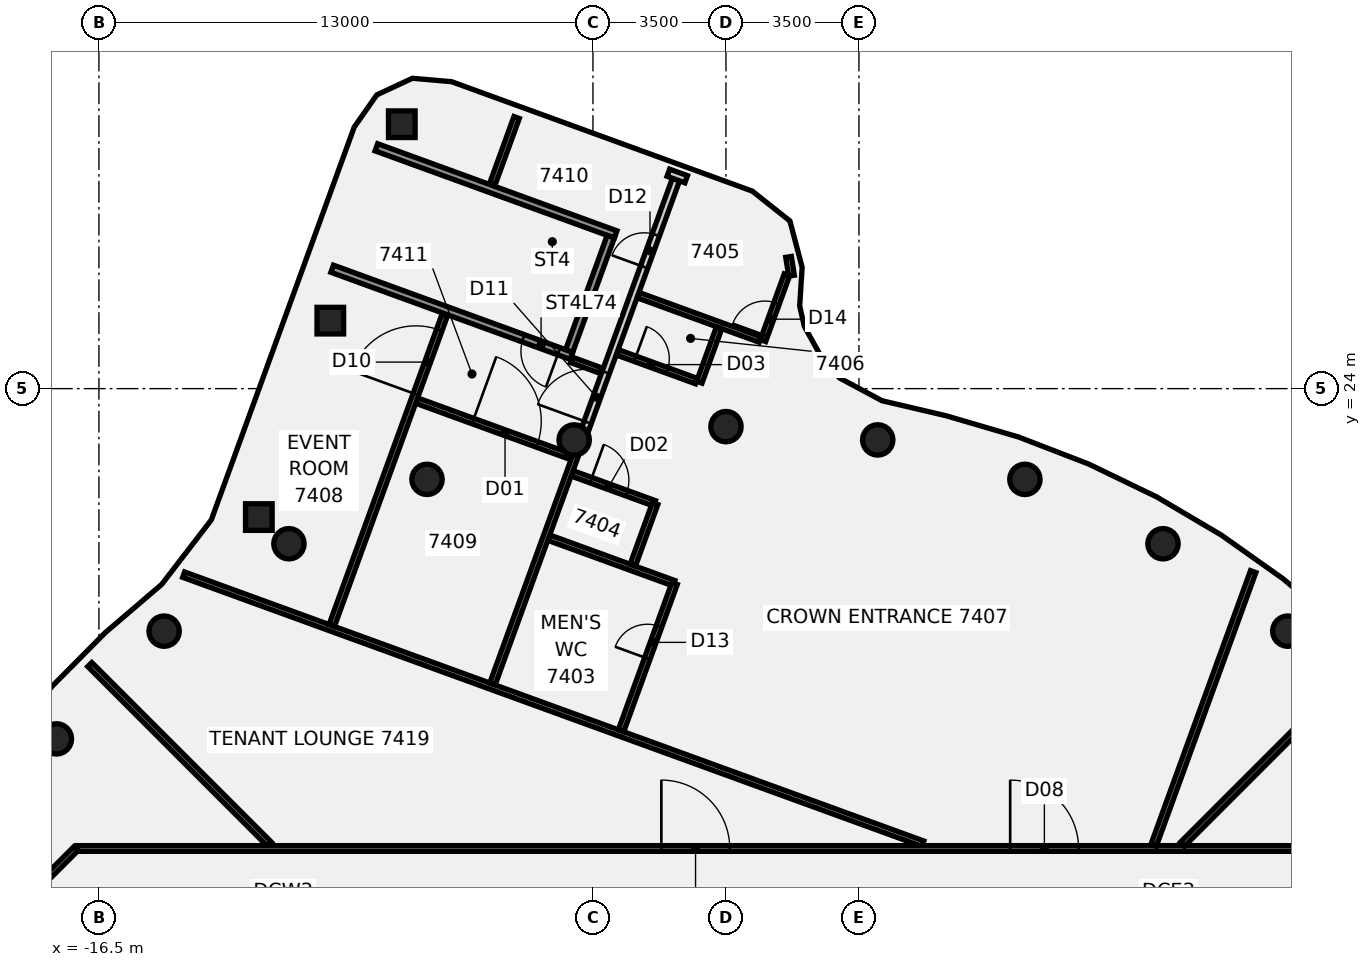
"""IFC4 building model, lengths in metres.
Left out: names, types, materials, properties, quantities, classifications, styles, units other than length and angle.
Written with IfcOpenShell. Run it as: python <this file> out.ifc"""

import sys

from ifc_helpers import new_model, si_unit, direction, frame, frame_2d, origin, origin_2d, place, context, subcontext, project, spatial, polyline, rectangle, circle, outline, extrude, element, fill, save


model = new_model("IFC4")
c1 = context("Model", 3, precision=1e-05, world=origin(), true_north=direction((0.0, 1.0)))
c2 = subcontext(c1, "Body", "Model", "MODEL_VIEW")
j1 = project(units=[si_unit("LENGTHUNIT", "METRE"), si_unit("PLANEANGLEUNIT", "RADIAN")], contexts=[c1])
p1 = place(None, origin())
s1 = spatial("IfcSite", under=j1, at=p1, CompositionType="ELEMENT")
p2 = place(p1, origin())
s2 = spatial("IfcBuilding", under=s1, at=p2, CompositionType="ELEMENT")
p3 = place(p2, frame((0.0, 0.0, 299.4)))
s3 = spatial("IfcBuildingStorey", under=s2, at=p3, CompositionType="ELEMENT", Elevation=299.4)
for number, where, z_axis, x_axis in (
    (1, (14.784, 17.619, -0.25), (0.0, 0.0, 1.0), (1.0, 0.0, 0.0)),
    (2, (11.5, 19.919, -0.25), (0.0, 0.0, 1.0), (1.0, 0.0, 0.0)),
    (3, (7.866, 21.613, -0.25), (0.0, 0.0, 1.0), (1.0, 0.0, 0.0)),
    (4, (3.994, 22.651, -0.25), (0.0, 0.0, 1.0), (1.0, 0.0, 0.0)),
    (5, (0.0, 23.0, -0.25), (0.0, 0.0, 1.0), (1.0, 0.0, 0.0)),
    (6, (-3.994, 22.651, -0.25), (0.0, 0.0, 1.0), (1.0, 0.0, 0.0)),
    (7, (-7.866, 21.613, -0.25), (0.0, 0.0, 1.0), (1.0, 0.0, 0.0)),
    (8, (-11.5, 19.919, -0.25), (0.0, 0.0, 1.0), (1.0, 0.0, 0.0)),
    (9, (-14.784, 17.619, -0.25), (0.0, 0.0, 1.0), (1.0, 0.0, 0.0)),
    (10, (-17.619, 14.784, -0.25), (0.0, 0.0, 1.0), (1.0, 0.0, 0.0)),
):
    element("IfcColumn", number, at=place(p3, frame(where, z_axis=z_axis, x_axis=x_axis)), inside=s3, PredefinedType="COLUMN", context=c2, shape_type="SweptSolid", body=[
        extrude(circle(Radius=0.4, at=origin_2d()), origin(), (0.0, 0.0, 1.0), 6.07),
    ])
for number, where, z_axis, x_axis in (
    (11, (-8.53, 30.957, -0.228), (0.0, 0.0, 1.0), (0.342, 0.94, 0.0)),
    (12, (-10.411, 25.789, -0.228), (0.0, 0.0, 1.0), (0.342, 0.94, 0.0)),
    (13, (-12.292, 20.621, -0.228), (0.0, 0.0, 1.0), (0.342, 0.94, 0.0)),
):
    element("IfcColumn", number, at=place(p3, frame(where, z_axis=z_axis, x_axis=x_axis)), inside=s3, PredefinedType="COLUMN", context=c2, shape_type="SweptSolid", body=[
        extrude(rectangle(XDim=0.7, YDim=0.7, at=origin_2d()), origin(), (0.0, 0.0, 1.0), 6.048),
    ])
p4 = place(p3, frame((-16.74, 16.74, 0.0), z_axis=(0.0, 0.0, 1.0), x_axis=(0.707106781187, -0.707106781187, 0.0)))
e14 = element("IfcWall", 14, at=p4, inside=s3, PredefinedType="PARTITIONING", context=c2, shape_type="SweptSolid", body=[
    extrude(rectangle(XDim=6.691, YDim=0.15, at=frame_2d((3.345, 0.0))), origin(), (0.0, 0.0, 1.0), 5.02),
])
p5 = place(p3, frame((-14.271, 19.106, 0.0), z_axis=(0.0, 0.0, 1.0), x_axis=(0.939707995486, -0.34197789873, 0.0)))
e15 = element("IfcWall", 15, at=p5, inside=s3, PredefinedType="PARTITIONING", context=c2, shape_type="SweptSolid", body=[
    extrude(rectangle(XDim=20.7, YDim=0.15, at=frame_2d((10.35, 0.0))), origin(), (0.0, 0.0, 1.0), 5.02),
])
p6 = place(p3, frame((-8.139, 23.685, 0.0), z_axis=(0.0, 0.0, 1.0), x_axis=(0.939717938518, -0.341950575415, 0.0)))
e16 = element("IfcWall", 16, at=p6, inside=s3, PredefinedType="PARTITIONING", context=c2, shape_type="SweptSolid", body=[
    extrude(rectangle(XDim=4.345, YDim=0.15, at=frame_2d((2.173, 0.0))), origin(), (0.0, 0.0, 1.0), 5.02),
])
p7 = place(p6, frame((1.575, 0.0, 0.0)))
e17 = element("IfcOpeningElement", 17, at=p7, cuts=e16, PredefinedType="OPENING", context=c2, shape_type="SweptSolid", body=[
    extrude(rectangle(XDim=1.8, YDim=2.1, at=frame_2d((0.9, 1.05))), frame((0.0, 0.085, 0.0), z_axis=(0.0, -1.0, 0.0), x_axis=(1.0, 0.0, 0.0)), (0.0, 0.0, 1.0), 0.17),
])
p8 = place(p3, frame((-4.664, 20.079, 0.0), z_axis=(0.0, 0.0, 1.0), x_axis=(0.939632669741, -0.342184812574, 0.0)))
e18 = element("IfcWall", 18, at=p8, inside=s3, PredefinedType="PARTITIONING", context=c2, shape_type="SweptSolid", body=[
    extrude(rectangle(XDim=3.505, YDim=0.15, at=frame_2d((1.753, 0.0))), origin(), (0.0, 0.0, 1.0), 5.02),
])
p9 = place(p3, frame((-4.048, 21.77, 0.0), z_axis=(0.0, 0.0, 1.0), x_axis=(0.939651079277, -0.342134256123, 0.0)))
e19 = element("IfcWall", 19, at=p9, inside=s3, PredefinedType="PARTITIONING", context=c2, shape_type="SweptSolid", body=[
    extrude(rectangle(XDim=2.305, YDim=0.15, at=frame_2d((1.152, 0.0))), origin(), (0.0, 0.0, 1.0), 5.02),
])
p10 = place(p9, frame((0.525, 0.0, 0.0)))
e20 = element("IfcOpeningElement", 20, at=p10, cuts=e19, PredefinedType="OPENING", context=c2, shape_type="SweptSolid", body=[
    extrude(rectangle(XDim=1.0, YDim=2.1, at=frame_2d((0.5, 1.05))), frame((0.0, 0.085, 0.0), z_axis=(0.0, -1.0, 0.0), x_axis=(1.0, 0.0, 0.0)), (0.0, 0.0, 1.0), 0.17),
])
p11 = place(p3, frame((-4.063, 24.756, 0.0), z_axis=(0.0, 0.0, 1.0), x_axis=(0.939710329429, -0.341971485308, 0.0)))
e21 = element("IfcWall", 21, at=p11, inside=s3, PredefinedType="PARTITIONING", context=c2, shape_type="SweptSolid", body=[
    extrude(rectangle(XDim=0.858, YDim=0.15, at=frame_2d((0.429, 0.0))), origin(), (0.0, 0.0, 1.0), 5.02),
])
p12 = place(p3, frame((-2.861, 24.957, 0.0), z_axis=(0.0, 0.0, 1.0), x_axis=(0.93968419655, -0.342043287836, 0.0)))
e22 = element("IfcWall", 22, at=p12, inside=s3, PredefinedType="PARTITIONING", context=c2, shape_type="SweptSolid", body=[
    extrude(rectangle(XDim=2.22, YDim=0.15, at=frame_2d((1.11, 0.0))), origin(), (0.0, 0.0, 1.0), 5.02),
])
p13 = place(p12, frame((0.5, 0.0, 0.0)))
e23 = element("IfcOpeningElement", 23, at=p13, cuts=e22, PredefinedType="OPENING", context=c2, shape_type="SweptSolid", body=[
    extrude(rectangle(XDim=0.9, YDim=2.1, at=frame_2d((0.45, 1.05))), frame((0.0, 0.085, 0.0), z_axis=(0.0, -1.0, 0.0), x_axis=(1.0, 0.0, 0.0)), (0.0, 0.0, 1.0), 0.17),
])
p14 = place(p3, frame((-2.314, 26.461, 0.0), z_axis=(0.0, 0.0, 1.0), x_axis=(0.939653710072, -0.342127030718, 0.0)))
e24 = element("IfcWall", 24, at=p14, inside=s3, PredefinedType="PARTITIONING", context=c2, shape_type="SweptSolid", body=[
    extrude(rectangle(XDim=3.42, YDim=0.15, at=frame_2d((1.71, 0.0))), origin(), (0.0, 0.0, 1.0), 5.02),
])
p15 = place(p3, frame((-17.065, 11.9, 0.0), z_axis=(0.0, 0.0, 1.0), x_axis=(1.0, 0.0, 0.0)))
e25 = element("IfcWall", 25, at=p15, inside=s3, PredefinedType="PARTITIONING", context=c2, shape_type="SweptSolid", body=[
    extrude(rectangle(XDim=34.165, YDim=0.15, at=frame_2d((17.083, 0.0))), origin(), (0.0, 0.0, 1.0), 5.02),
])
p16 = place(p15, frame((24.544, 0.0, 0.0)))
e26 = element("IfcOpeningElement", 26, at=p16, cuts=e25, PredefinedType="OPENING", context=c2, shape_type="SweptSolid", body=[
    extrude(rectangle(XDim=1.8, YDim=2.1, at=frame_2d((0.9, 1.05))), frame((0.0, 0.085, 0.0), z_axis=(0.0, -1.0, 0.0), x_axis=(1.0, 0.0, 0.0)), (0.0, 0.0, 1.0), 0.17),
])
p17 = place(p15, frame((15.365, 0.0, 0.0)))
e27 = element("IfcOpeningElement", 27, at=p17, cuts=e25, PredefinedType="OPENING", context=c2, shape_type="SweptSolid", body=[
    extrude(rectangle(XDim=1.8, YDim=2.1, at=frame_2d((0.9, 1.05))), frame((0.0, 0.085, 0.0), z_axis=(0.0, -1.0, 0.0), x_axis=(1.0, 0.0, 0.0)), (0.0, 0.0, 1.0), 0.17),
])
p18 = place(p3, frame((-18.872, 10.128, 0.0), z_axis=(0.0, 0.0, 1.0), x_axis=(0.707106781187, 0.707106781187, 0.0)))
e28 = element("IfcWall", 28, at=p18, inside=s3, PredefinedType="PARTITIONING", context=c2, shape_type="SweptSolid", body=[
    extrude(rectangle(XDim=2.505, YDim=0.15, at=frame_2d((1.253, 0.0))), origin(), (0.0, 0.0, 1.0), 5.02),
])
p19 = place(p3, frame((12.01, 12.01, 0.0), z_axis=(0.0, 0.0, 1.0), x_axis=(0.707106781187, 0.707106781187, 0.0)))
e29 = element("IfcWall", 29, at=p19, inside=s3, PredefinedType="PARTITIONING", context=c2, shape_type="SweptSolid", body=[
    extrude(rectangle(XDim=6.691, YDim=0.15, at=frame_2d((3.345, 0.0))), origin(), (0.0, 0.0, 1.0), 5.02),
])
p20 = place(p3, frame((-10.373, 17.768, 0.0), z_axis=(0.0, 0.0, 1.0), x_axis=(0.342034217522, 0.939687498078, 0.0)))
e30 = element("IfcWall", 30, at=p20, inside=s3, PredefinedType="PARTITIONING", context=c2, shape_type="SweptSolid", body=[
    extrude(rectangle(XDim=8.685, YDim=0.15, at=frame_2d((4.342, 0.0))), origin(), (0.0, 0.0, 1.0), 5.02),
])
p21 = place(p20, frame((6.475, 0.0, 0.0)))
e31 = element("IfcOpeningElement", 31, at=p21, cuts=e30, PredefinedType="OPENING", context=c2, shape_type="SweptSolid", body=[
    extrude(rectangle(XDim=1.8, YDim=2.1, at=frame_2d((0.9, 1.05))), frame((0.0, 0.085, 0.0), z_axis=(0.0, -1.0, 0.0), x_axis=(1.0, 0.0, 0.0)), (0.0, 0.0, 1.0), 0.17),
])
p22 = place(p3, frame((-6.144, 29.387, 0.0), z_axis=(0.0, 0.0, 1.0), x_axis=(0.342080568825, 0.939670625502, 0.0)))
e32 = element("IfcWall", 32, at=p22, inside=s3, PredefinedType="PARTITIONING", context=c2, shape_type="SweptSolid", body=[
    extrude(rectangle(XDim=1.858, YDim=0.15, at=frame_2d((0.929, 0.0))), origin(), (0.0, 0.0, 1.0), 5.02),
])
p23 = place(p3, frame((-6.144, 16.229, 0.0), z_axis=(0.0, 0.0, 1.0), x_axis=(0.341892869115, 0.93973893505, 0.0)))
e33 = element("IfcWall", 33, at=p23, inside=s3, PredefinedType="PARTITIONING", context=c2, shape_type="SweptSolid", body=[
    extrude(rectangle(XDim=6.542, YDim=0.15, at=frame_2d((3.271, 0.0))), origin(), (0.0, 0.0, 1.0), 5.02),
])
p24 = place(p3, frame((-3.754, 22.8, 0.0), z_axis=(0.0, 0.0, 1.0), x_axis=(0.341899737301, 0.939736436259, 0.0)))
e34 = element("IfcWall", 34, at=p24, inside=s3, PredefinedType="PARTITIONING", context=c2, shape_type="SweptSolid", body=[
    extrude(rectangle(XDim=7.131, YDim=0.2, at=frame_2d((3.566, 0.0))), origin(), (0.0, 0.0, 1.0), 5.02),
])
p25 = place(p24, frame((0.332, 0.0, 0.0)))
e35 = element("IfcOpeningElement", 35, at=p25, cuts=e34, PredefinedType="OPENING", context=c2, shape_type="SweptSolid", body=[
    extrude(rectangle(XDim=1.4, YDim=2.1, at=frame_2d((0.7, 1.05))), frame((0.0, 0.11, 0.0), z_axis=(0.0, -1.0, 0.0), x_axis=(1.0, 0.0, 0.0)), (0.0, 0.0, 1.0), 0.22),
])
p26 = place(p24, frame((4.683, 0.0, 0.0)))
e36 = element("IfcOpeningElement", 36, at=p26, cuts=e34, PredefinedType="OPENING", context=c2, shape_type="SweptSolid", body=[
    extrude(rectangle(XDim=0.9, YDim=2.1, at=frame_2d((0.45, 1.05))), frame((0.0, 0.11, 0.0), z_axis=(0.0, -1.0, 0.0), x_axis=(1.0, 0.0, 0.0)), (0.0, 0.0, 1.0), 0.22),
])
p27 = place(p3, frame((-2.761, 14.998, 0.0), z_axis=(0.0, 0.0, 1.0), x_axis=(0.341985460064, 0.939705243736, 0.0)))
e37 = element("IfcWall", 37, at=p27, inside=s3, PredefinedType="PARTITIONING", context=c2, shape_type="SweptSolid", body=[
    extrude(rectangle(XDim=4.124, YDim=0.15, at=frame_2d((2.062, 0.0))), origin(), (0.0, 0.0, 1.0), 5.02),
])
p28 = place(p27, frame((2.025, 0.0, 0.0)))
e38 = element("IfcOpeningElement", 38, at=p28, cuts=e37, PredefinedType="OPENING", context=c2, shape_type="SweptSolid", body=[
    extrude(rectangle(XDim=0.9, YDim=2.1, at=frame_2d((0.45, 1.05))), frame((0.0, 0.085, 0.0), z_axis=(0.0, -1.0, 0.0), x_axis=(1.0, 0.0, 0.0)), (0.0, 0.0, 1.0), 0.17),
])
p29 = place(p3, frame((0.975, 25.263, 0.0), z_axis=(0.0, 0.0, 1.0), x_axis=(0.341881428649, 0.939743097205, 0.0)))
e39 = element("IfcWall", 39, at=p29, inside=s3, PredefinedType="PARTITIONING", context=c2, shape_type="SweptSolid", body=[
    extrude(rectangle(XDim=1.842, YDim=0.15, at=frame_2d((0.921, 0.0))), origin(), (0.0, 0.0, 1.0), 5.02),
])
p30 = place(p29, frame((0.15, 0.0, 0.0)))
e40 = element("IfcOpeningElement", 40, at=p30, cuts=e39, PredefinedType="OPENING", context=c2, shape_type="SweptSolid", body=[
    extrude(rectangle(XDim=0.9, YDim=2.1, at=frame_2d((0.45, 1.05))), frame((0.0, 0.085, 0.0), z_axis=(0.0, -1.0, 0.0), x_axis=(1.0, 0.0, 0.0)), (0.0, 0.0, 1.0), 0.17),
])
p31 = place(p3, frame((-2.452, 19.354, 0.0), z_axis=(0.0, 0.0, 1.0), x_axis=(0.341765797908, 0.939785155969, 0.0)))
e41 = element("IfcWall", 41, at=p31, inside=s3, PredefinedType="PARTITIONING", context=c2, shape_type="SweptSolid", body=[
    extrude(rectangle(XDim=1.724, YDim=0.15, at=frame_2d((0.862, 0.0))), origin(), (0.0, 0.0, 1.0), 5.02),
])
p32 = place(p3, frame((-0.701, 24.17, 0.0), z_axis=(0.0, 0.0, 1.0), x_axis=(0.341897280994, 0.939737329922, 0.0)))
e42 = element("IfcWall", 42, at=p32, inside=s3, PredefinedType="PARTITIONING", context=c2, shape_type="SweptSolid", body=[
    extrude(rectangle(XDim=1.525, YDim=0.15, at=frame_2d((0.763, 0.0))), origin(), (0.0, 0.0, 1.0), 5.02),
])
p33 = place(p3, frame((11.254, 11.985, 0.0), z_axis=(0.0, 0.0, 1.0), x_axis=(0.341891443356, 0.939739453764, 0.0)))
e43 = element("IfcWall", 43, at=p33, inside=s3, PredefinedType="PARTITIONING", context=c2, shape_type="SweptSolid", body=[
    extrude(rectangle(XDim=7.662, YDim=0.15, at=frame_2d((3.831, 0.0))), origin(), (0.0, 0.0, 1.0), 5.02),
])
p34 = place(p3, frame((1.725, 26.972, 0.0), z_axis=(0.0, 0.0, 1.0), x_axis=(-0.155285488936, 0.987869635593, 0.0)))
e44 = element("IfcWall", 44, at=p34, inside=s3, PredefinedType="PARTITIONING", context=c2, shape_type="SweptSolid", body=[
    extrude(rectangle(XDim=0.5, YDim=0.15, at=frame_2d((0.25, 0.0))), origin(), (0.0, 0.0, 1.0), 5.02),
])
p35 = place(p3, frame((-1.046, 29.51, 0.0), z_axis=(0.0, 0.0, 1.0), x_axis=(-0.939736367656, 0.341899925862, 0.0)))
e45 = element("IfcWall", 45, at=p35, inside=s3, PredefinedType="PARTITIONING", context=c2, shape_type="SweptSolid", body=[
    extrude(rectangle(XDim=0.5, YDim=0.2, at=frame_2d((0.25, 0.0))), origin(), (0.0, 0.0, 1.0), 5.02),
])
p36 = place(p3, frame((-4.066, 24.863, -0.25), z_axis=(0.0, 0.0, 1.0), x_axis=(-0.939709347419, 0.341974183781, 0.0)))
e46 = element("IfcWall", 46, at=p36, inside=s3, PredefinedType="SHEAR", context=c2, shape_type="SweptSolid", body=[
    extrude(rectangle(XDim=6.7, YDim=0.2, at=frame_2d((3.35, 0.0))), origin(), (0.0, 0.0, 1.0), 6.07),
])
p37 = place(p36, frame((0.35, 0.0, 0.0)))
e47 = element("IfcOpeningElement", 47, at=p37, cuts=e46, PredefinedType="OPENING", context=c2, shape_type="SweptSolid", body=[
    extrude(rectangle(XDim=1.0, YDim=2.1, at=frame_2d((0.5, 1.05))), frame((0.0, 0.11, 0.0), z_axis=(0.0, -1.0, 0.0), x_axis=(1.0, 0.0, 0.0)), (0.0, 0.0, 1.0), 0.22),
])
p38 = place(p3, frame((-2.903, 28.058, -0.25), z_axis=(0.0, 0.0, 1.0), x_axis=(-0.939693375008, 0.342018071111, 0.0)))
e48 = element("IfcWall", 48, at=p38, inside=s3, PredefinedType="SHEAR", context=c2, shape_type="SweptSolid", body=[
    extrude(rectangle(XDim=6.7, YDim=0.2, at=frame_2d((3.35, 0.0))), origin(), (0.0, 0.0, 1.0), 6.07),
])
p39 = place(p3, frame((-3.031, 27.998, -0.25), z_axis=(0.0, 0.0, 1.0), x_axis=(-0.341975850632, -0.939708740826, 0.0)))
e49 = element("IfcWall", 49, at=p39, inside=s3, PredefinedType="SHEAR", context=c2, shape_type="SweptSolid", body=[
    extrude(rectangle(XDim=3.2, YDim=0.2, at=frame_2d((1.6, 0.0))), origin(), (0.0, 0.0, 1.0), 6.07),
])
p40 = place(p3, frame((0.0, 0.0, -0.25)))
e50 = element("IfcWall", 50, at=p40, inside=s3, PredefinedType="SHEAR", context=c2, shape_type="SweptSolid", body=[
    extrude(outline(polyline([(-9.045, 30.187), (-9.233, 30.256), (-10.328, 27.249), (-10.14, 27.18), (-9.045, 30.187)])), origin(), (0.0, 0.0, 1.0), 6.07),
])
p41 = place(p7, frame((1.8, 0.0, 0.0), z_axis=(0.0, 0.0, 1.0), x_axis=(-1.0, 0.0, 0.0)))
e51 = element("IfcDoor", 51, at=p41, inside=s3, OperationType="DOUBLE_DOOR_SINGLE_SWING", PredefinedType="DOOR", context=c2, shape_type="SweptSolid", body=[
    extrude(rectangle(XDim=1.8, YDim=2.1, at=frame_2d((0.9, 1.05))), frame((0.0, 0.025, 0.0), z_axis=(0.0, -1.0, 0.0), x_axis=(1.0, 0.0, 0.0)), (0.0, 0.0, 1.0), 0.05),
])
fill(e17, e51)
p42 = place(p10, frame((1.0, 0.0, 0.0), z_axis=(0.0, 0.0, 1.0), x_axis=(-1.0, 0.0, 0.0)))
e52 = element("IfcDoor", 52, at=p42, inside=s3, OperationType="SINGLE_SWING_LEFT", PredefinedType="DOOR", context=c2, shape_type="SweptSolid", body=[
    extrude(rectangle(XDim=1.0, YDim=2.1, at=frame_2d((0.5, 1.05))), frame((0.0, 0.025, 0.0), z_axis=(0.0, -1.0, 0.0), x_axis=(1.0, 0.0, 0.0)), (0.0, 0.0, 1.0), 0.05),
])
fill(e20, e52)
p43 = place(p13, origin())
e53 = element("IfcDoor", 53, at=p43, inside=s3, OperationType="SINGLE_SWING_RIGHT", PredefinedType="DOOR", context=c2, shape_type="SweptSolid", body=[
    extrude(rectangle(XDim=0.9, YDim=2.1, at=frame_2d((0.45, 1.05))), frame((0.0, 0.025, 0.0), z_axis=(0.0, -1.0, 0.0), x_axis=(1.0, 0.0, 0.0)), (0.0, 0.0, 1.0), 0.05),
])
fill(e23, e53)
p44 = place(p16, frame((1.8, 0.0, 0.0), z_axis=(0.0, 0.0, 1.0), x_axis=(-1.0, 0.0, 0.0)))
e54 = element("IfcDoor", 54, at=p44, inside=s3, OperationType="DOUBLE_DOOR_SINGLE_SWING", PredefinedType="DOOR", context=c2, shape_type="SweptSolid", body=[
    extrude(rectangle(XDim=1.8, YDim=2.1, at=frame_2d((0.9, 1.05))), frame((0.0, 0.025, 0.0), z_axis=(0.0, -1.0, 0.0), x_axis=(1.0, 0.0, 0.0)), (0.0, 0.0, 1.0), 0.05),
])
fill(e26, e54)
p45 = place(p17, origin())
e55 = element("IfcDoor", 55, at=p45, inside=s3, OperationType="DOUBLE_DOOR_SINGLE_SWING", PredefinedType="DOOR", context=c2, shape_type="SweptSolid", body=[
    extrude(rectangle(XDim=1.8, YDim=2.1, at=frame_2d((0.9, 1.05))), frame((0.0, 0.025, 0.0), z_axis=(0.0, -1.0, 0.0), x_axis=(1.0, 0.0, 0.0)), (0.0, 0.0, 1.0), 0.05),
])
fill(e27, e55)
p46 = place(p21, origin())
e56 = element("IfcDoor", 56, at=p46, inside=s3, OperationType="DOUBLE_DOOR_SINGLE_SWING", PredefinedType="DOOR", context=c2, shape_type="SweptSolid", body=[
    extrude(rectangle(XDim=1.8, YDim=2.1, at=frame_2d((0.9, 1.05))), frame((0.0, 0.025, 0.0), z_axis=(0.0, -1.0, 0.0), x_axis=(1.0, 0.0, 0.0)), (0.0, 0.0, 1.0), 0.05),
])
fill(e31, e56)
p47 = place(p25, frame((1.4, 0.0, 0.0), z_axis=(0.0, 0.0, 1.0), x_axis=(-1.0, 0.0, 0.0)))
e57 = element("IfcDoor", 57, at=p47, inside=s3, OperationType="DOUBLE_DOOR_SINGLE_SWING", PredefinedType="DOOR", context=c2, shape_type="SweptSolid", body=[
    extrude(rectangle(XDim=1.4, YDim=2.1, at=frame_2d((0.7, 1.05))), frame((0.0, 0.025, 0.0), z_axis=(0.0, -1.0, 0.0), x_axis=(1.0, 0.0, 0.0)), (0.0, 0.0, 1.0), 0.05),
])
fill(e35, e57)
p48 = place(p26, origin())
e58 = element("IfcDoor", 58, at=p48, inside=s3, OperationType="SINGLE_SWING_LEFT", PredefinedType="DOOR", context=c2, shape_type="SweptSolid", body=[
    extrude(rectangle(XDim=0.9, YDim=2.1, at=frame_2d((0.45, 1.05))), frame((0.0, 0.025, 0.0), z_axis=(0.0, -1.0, 0.0), x_axis=(1.0, 0.0, 0.0)), (0.0, 0.0, 1.0), 0.05),
])
fill(e36, e58)
p49 = place(p28, origin())
e59 = element("IfcDoor", 59, at=p49, inside=s3, OperationType="SINGLE_SWING_LEFT", PredefinedType="DOOR", context=c2, shape_type="SweptSolid", body=[
    extrude(rectangle(XDim=0.9, YDim=2.1, at=frame_2d((0.45, 1.05))), frame((0.0, 0.025, 0.0), z_axis=(0.0, -1.0, 0.0), x_axis=(1.0, 0.0, 0.0)), (0.0, 0.0, 1.0), 0.05),
])
fill(e38, e59)
p50 = place(p30, origin())
e60 = element("IfcDoor", 60, at=p50, inside=s3, OperationType="SINGLE_SWING_RIGHT", PredefinedType="DOOR", context=c2, shape_type="SweptSolid", body=[
    extrude(rectangle(XDim=0.9, YDim=2.1, at=frame_2d((0.45, 1.05))), frame((0.0, 0.025, 0.0), z_axis=(0.0, -1.0, 0.0), x_axis=(1.0, 0.0, 0.0)), (0.0, 0.0, 1.0), 0.05),
])
fill(e40, e60)
p51 = place(p37, origin())
e61 = element("IfcDoor", 61, at=p51, inside=s3, OperationType="SINGLE_SWING_LEFT", PredefinedType="DOOR", context=c2, shape_type="SweptSolid", body=[
    extrude(rectangle(XDim=1.0, YDim=2.1, at=frame_2d((0.5, 1.05))), frame((0.0, 0.025, 0.0), z_axis=(0.0, -1.0, 0.0), x_axis=(1.0, 0.0, 0.0)), (0.0, 0.0, 1.0), 0.05),
])
fill(e47, e61)
save(model, sys.argv[1])
